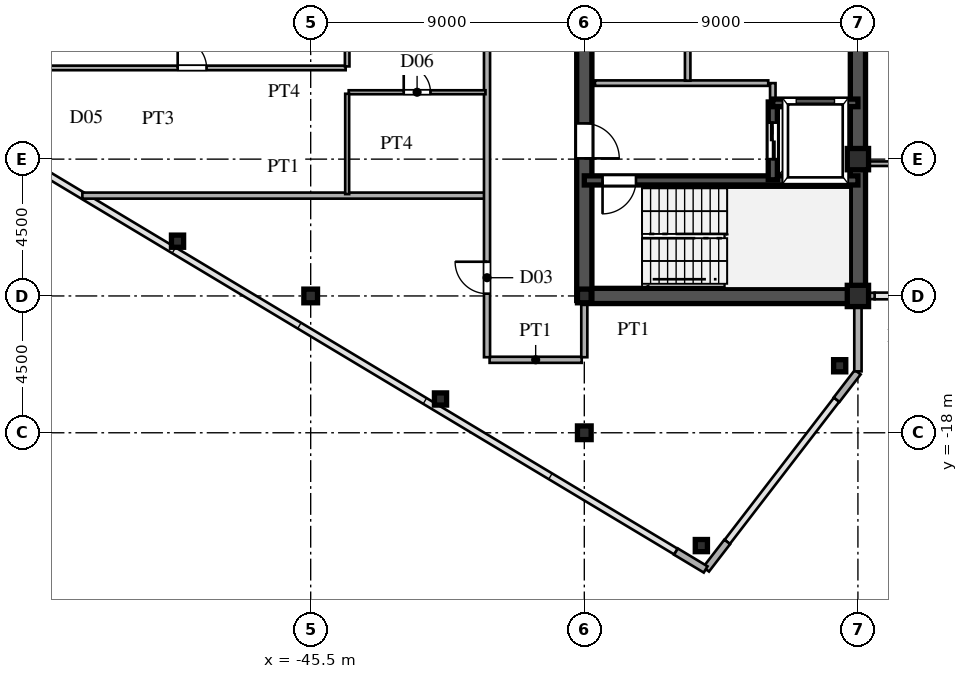
"""IFC4 building model, lengths in metres.
Left out: names, types, materials, properties, quantities, classifications, styles, units other than length and angle.
Written with IfcOpenShell. Run it as: python <this file> out.ifc"""

import sys

from ifc_helpers import new_model, si_unit, direction, frame, frame_2d, origin, origin_2d, place, context, subcontext, project, spatial, rectangle, hollow_rectangle, i_section, extrude, source, transform, mapped, element, fill, save


model = new_model("IFC4")
c1 = context("Model", 3, precision=1e-05, world=origin(), true_north=direction((0.0, 1.0)))
c2 = subcontext(c1, "Body", "Model", "MODEL_VIEW")
j1 = project(units=[si_unit("LENGTHUNIT", "METRE"), si_unit("PLANEANGLEUNIT", "RADIAN")], contexts=[c1])
p1 = place(None, origin())
s1 = spatial("IfcSite", under=j1, at=p1, CompositionType="ELEMENT")
p2 = place(p1, origin())
s2 = spatial("IfcBuilding", under=s1, at=p2, CompositionType="ELEMENT")
p3 = place(p2, frame((0.0, 0.0, 250.65)))
s3 = spatial("IfcBuildingStorey", under=s2, at=p3, CompositionType="ELEMENT", Elevation=250.65)
m1 = source(origin(), c2, "Body", "SweptSolid", [
    extrude(hollow_rectangle(XDim=0.7, YDim=0.7, WallThickness=0.03, at=origin_2d()), origin(), (0.0, 0.0, 1.0), 3.75),
])
for number, where, z_axis, x_axis in (
    (1, (-27.5, -13.5, 0.0), (0.0, 0.0, 1.0), (1.0, 0.0, 0.0)),
    (2, (-27.5, -9.0, 0.0), (0.0, 0.0, 1.0), (1.0, 0.0, 0.0)),
):
    element("IfcColumn", number, at=place(p3, frame(where, z_axis=z_axis, x_axis=x_axis)), inside=s3, PredefinedType="COLUMN", context=c2, shape_type="MappedRepresentation", body=[
        mapped(m1, transform((0.0, 0.0, 0.0), scale=1.0)),
    ])
m2 = source(origin(), c2, "Body", "SweptSolid", [
    extrude(i_section(OverallWidth=0.45, OverallDepth=0.45, WebThickness=0.016, FlangeThickness=0.025, at=origin_2d()), origin(), (0.0, 0.0, 1.0), 3.75),
])
for number, where, z_axis, x_axis in (
    (3, (-36.5, -18.0, 0.0), (0.0, 0.0, 1.0), (1.0, 0.0, 0.0)),
    (4, (-36.5, -13.5, 0.0), (0.0, 0.0, 1.0), (1.0, 0.0, 0.0)),
    (5, (-45.5, -13.5, 0.0), (0.0, 0.0, 1.0), (1.0, 0.0, 0.0)),
):
    element("IfcColumn", number, at=place(p3, frame(where, z_axis=z_axis, x_axis=x_axis)), inside=s3, PredefinedType="COLUMN", context=c2, shape_type="MappedRepresentation", body=[
        mapped(m2, transform((0.0, 0.0, 0.0), scale=1.0)),
    ])
m3 = source(origin(), c2, "Body", "SweptSolid", [
    extrude(hollow_rectangle(XDim=0.4, YDim=0.4, WallThickness=0.016, at=origin_2d()), origin(), (0.0, 0.0, 1.0), 3.75),
])
for number, where, z_axis, x_axis in (
    (6, (-28.1, -15.796, 0.0), (0.0, 0.0, 1.0), (1.0, 0.0, 0.0)),
    (7, (-32.65, -21.71, 0.0), (0.0, 0.0, 1.0), (1.0, 0.0, 0.0)),
    (8, (-41.23, -16.889, 0.0), (0.0, 0.0, 1.0), (1.0, 0.0, 0.0)),
    (9, (-49.88, -11.699, 0.0), (0.0, 0.0, 1.0), (1.0, 0.0, 0.0)),
):
    element("IfcColumn", number, at=place(p3, frame(where, z_axis=z_axis, x_axis=x_axis)), inside=s3, PredefinedType="COLUMN", context=c2, shape_type="MappedRepresentation", body=[
        mapped(m3, transform((0.0, 0.0, 0.0), scale=1.0)),
    ])
p4 = place(p3, frame((-27.5, -15.98, 0.0), z_axis=(0.0, 0.0, 1.0), x_axis=(0.0, 1.0, 0.0)))
e10 = element("IfcWall", 10, at=p4, inside=s3, PredefinedType="SOLIDWALL", context=c2, shape_type="SweptSolid", body=[
    extrude(rectangle(XDim=1.605, YDim=0.24, at=frame_2d((0.803, 0.0))), origin(), (0.0, 0.0, 1.0), 3.53),
])
p5 = place(p3, frame((-27.5, -14.375, 0.0), z_axis=(0.0, 0.0, 1.0), x_axis=(0.0, 1.0, 0.0)))
e11 = element("IfcWall", 11, at=p5, inside=s3, PredefinedType="SOLIDWALL", context=c2, shape_type="SweptSolid", body=[
    extrude(rectangle(XDim=0.62, YDim=0.24, at=frame_2d((0.31, 0.0))), origin(), (0.0, 0.0, 1.0), 3.03),
])
for number, where, z_axis, x_axis in (
    (12, (-33.486, -21.908, 0.0), (0.0, 0.0, 1.0), (0.857, -0.515, 0.0)),
    (13, (-32.494, -22.492, 0.0), (0.0, 0.0, 1.0), (0.61, 0.793, 0.0)),
    (14, (-28.201, -16.912, 0.0), (0.0, 0.0, 1.0), (0.61, 0.793, 0.0)),
):
    element("IfcWall", number, at=place(p3, frame(where, z_axis=z_axis, x_axis=x_axis)), inside=s3, PredefinedType="SOLIDWALL", context=c2, shape_type="SweptSolid", body=[
        extrude(rectangle(XDim=1.14, YDim=0.24, at=frame_2d((0.57, 0.0))), origin(), (0.0, 0.0, 1.0), 3.53),
    ])
p6 = place(p3, frame((-27.49, -13.5, 0.0), z_axis=(0.0, 0.0, 1.0), x_axis=(1.0, 0.0, 0.0)))
e15 = element("IfcWall", 15, at=p6, inside=s3, PredefinedType="SOLIDWALL", context=c2, shape_type="SweptSolid", body=[
    extrude(rectangle(XDim=0.54, YDim=0.21, at=frame_2d((0.27, 0.0))), origin(), (0.0, 0.0, 1.0), 3.03),
])
p7 = place(p3, frame((-27.5, -13.5, 0.0), z_axis=(0.0, 0.0, 1.0), x_axis=(0.0, 1.0, 0.0)))
e16 = element("IfcWall", 16, at=p7, inside=s3, PredefinedType="SHEAR", context=c2, shape_type="SweptSolid", body=[
    extrude(rectangle(XDim=12.2, YDim=0.5, at=frame_2d((6.1, 0.0))), origin(), (0.0, 0.0, 1.0), 3.53),
])
p8 = place(p3, frame((-36.5, -13.5, 0.0), z_axis=(0.0, 0.0, 1.0), x_axis=(1.0, 0.0, 0.0)))
e17 = element("IfcWall", 17, at=p8, inside=s3, PredefinedType="SHEAR", context=c2, shape_type="SweptSolid", body=[
    extrude(rectangle(XDim=9.0, YDim=0.5, at=frame_2d((4.5, 0.0))), origin(), (0.0, 0.0, 1.0), 3.53),
])
p9 = place(p3, frame((-36.5, -13.65, 0.0), z_axis=(0.0, 0.0, 1.0), x_axis=(0.0, 1.0, 0.0)))
e18 = element("IfcWall", 18, at=p9, inside=s3, PredefinedType="SHEAR", context=c2, shape_type="SweptSolid", body=[
    extrude(rectangle(XDim=7.15, YDim=0.5, at=frame_2d((3.575, 0.0))), origin(), (0.0, 0.0, 1.0), 3.53),
])
p10 = place(p9, frame((4.675, 0.0, 0.0)))
e19 = element("IfcOpeningElement", 19, at=p10, cuts=e18, PredefinedType="OPENING", context=c2, shape_type="SweptSolid", body=[
    extrude(rectangle(XDim=1.15, YDim=2.2, at=frame_2d((0.575, 1.1))), frame((0.0, 0.26, 0.0), z_axis=(0.0, -1.0, 0.0), x_axis=(1.0, 0.0, 0.0)), (0.0, 0.0, 1.0), 0.52),
])
p11 = place(p3, frame((-36.5, -6.5, 0.0), z_axis=(0.0, 0.0, 1.0), x_axis=(0.0, 1.0, 0.0)))
e20 = element("IfcWall", 20, at=p11, inside=s3, PredefinedType="SHEAR", context=c2, shape_type="SweptSolid", body=[
    extrude(rectangle(XDim=5.2, YDim=0.5, at=frame_2d((2.6, 0.0))), origin(), (0.0, 0.0, 1.0), 3.53),
])
p12 = place(p11, frame((2.125, 0.0, 0.0)))
e21 = element("IfcOpeningElement", 21, at=p12, cuts=e20, PredefinedType="OPENING", context=c2, shape_type="SweptSolid", body=[
    extrude(rectangle(XDim=0.95, YDim=2.15, at=frame_2d((0.475, 1.075))), frame((0.0, 0.26, 0.0), z_axis=(0.0, -1.0, 0.0), x_axis=(1.0, 0.0, 0.0)), (0.0, 0.0, 1.0), 0.52),
])
p13 = place(p3, frame((-36.5, -9.7, 0.0), z_axis=(0.0, 0.0, 1.0), x_axis=(1.0, 0.0, 0.0)))
e22 = element("IfcWall", 22, at=p13, inside=s3, PredefinedType="SHEAR", context=c2, shape_type="SweptSolid", body=[
    extrude(rectangle(XDim=9.0, YDim=0.3, at=frame_2d((4.5, 0.0))), origin(), (0.0, 0.0, 1.0), 3.53),
])
p14 = place(p13, frame((0.6, 0.0, 0.0)))
e23 = element("IfcOpeningElement", 23, at=p14, cuts=e22, PredefinedType="OPENING", context=c2, shape_type="SweptSolid", body=[
    extrude(rectangle(XDim=1.1, YDim=2.2, at=frame_2d((0.55, 1.1))), frame((0.0, 0.16, 0.0), z_axis=(0.0, -1.0, 0.0), x_axis=(1.0, 0.0, 0.0)), (0.0, 0.0, 1.0), 0.32),
])
p15 = place(p3, frame((-30.3, -7.15, 0.0), z_axis=(0.0, 0.0, 1.0), x_axis=(1.0, 0.0, 0.0)))
e24 = element("IfcWall", 24, at=p15, inside=s3, PredefinedType="SHEAR", context=c2, shape_type="SweptSolid", body=[
    extrude(rectangle(XDim=2.8, YDim=0.25, at=frame_2d((1.4, 0.0))), origin(), (0.0, 0.0, 1.0), 3.53),
])
p16 = place(p3, frame((-30.3, -9.68, 0.0), z_axis=(0.0, 0.0, 1.0), x_axis=(0.0, 1.0, 0.0)))
e25 = element("IfcWall", 25, at=p16, inside=s3, PredefinedType="SHEAR", context=c2, shape_type="SweptSolid", body=[
    extrude(rectangle(XDim=2.56, YDim=0.3, at=frame_2d((1.28, 0.0))), origin(), (0.0, 0.0, 1.0), 3.53),
])
p17 = place(p16, frame((0.68, 0.0, 0.0)))
e26 = element("IfcOpeningElement", 26, at=p17, cuts=e25, PredefinedType="OPENING", context=c2, shape_type="SweptSolid", body=[
    extrude(rectangle(XDim=1.2, YDim=2.25, at=frame_2d((0.6, 1.125))), frame((0.0, 0.16, 0.0), z_axis=(0.0, -1.0, 0.0), x_axis=(1.0, 0.0, 0.0)), (0.0, 0.0, 1.0), 0.32),
])
p18 = place(p3, frame((-36.15, -6.5, 0.0), z_axis=(0.0, 0.0, 1.0), x_axis=(1.0, 0.0, 0.0)))
e27 = element("IfcWall", 27, at=p18, inside=s3, PredefinedType="PARTITIONING", context=c2, shape_type="SweptSolid", body=[
    extrude(rectangle(XDim=5.7, YDim=0.18, at=frame_2d((2.85, 0.0))), origin(), (0.0, 0.0, 1.0), 3.53),
])
p19 = place(p3, frame((-30.3, -7.12, 0.0), z_axis=(0.0, 0.0, 1.0), x_axis=(0.0, 1.0, 0.0)))
e28 = element("IfcWall", 28, at=p19, inside=s3, PredefinedType="PARTITIONING", context=c2, shape_type="SweptSolid", body=[
    extrude(rectangle(XDim=0.62, YDim=0.18, at=frame_2d((0.31, 0.0))), origin(), (0.0, 0.0, 1.0), 3.53),
])
p20 = place(p3, frame((-33.1, -6.42, 0.0), z_axis=(0.0, 0.0, 1.0), x_axis=(0.0, 1.0, 0.0)))
e29 = element("IfcWall", 29, at=p20, inside=s3, PredefinedType="PARTITIONING", context=c2, shape_type="SweptSolid", body=[
    extrude(rectangle(XDim=5.04, YDim=0.18, at=frame_2d((2.52, 0.0))), origin(), (0.0, 0.0, 1.0), 3.53),
])
p21 = place(p3, frame((-39.615, -15.6, 0.0), z_axis=(0.0, 0.0, 1.0), x_axis=(1.0, 0.0, 0.0)))
e30 = element("IfcWall", 30, at=p21, inside=s3, PredefinedType="PARTITIONING", context=c2, shape_type="SweptSolid", body=[
    extrude(rectangle(XDim=3.03, YDim=0.2, at=frame_2d((1.515, 0.0))), origin(), (0.0, 0.0, 1.0), 3.53),
])
p22 = place(p3, frame((-53.01, -10.2, 0.0), z_axis=(0.0, 0.0, 1.0), x_axis=(1.0, 0.0, 0.0)))
e31 = element("IfcWall", 31, at=p22, inside=s3, PredefinedType="PARTITIONING", context=c2, shape_type="SweptSolid", body=[
    extrude(rectangle(XDim=13.23, YDim=0.2, at=frame_2d((6.615, 0.0))), origin(), (0.0, 0.0, 1.0), 3.53),
])
p23 = place(p3, frame((-27.245, -9.15, 0.0), z_axis=(0.0, 0.0, 1.0), x_axis=(1.0, 0.0, 0.0)))
e32 = element("IfcWall", 32, at=p23, inside=s3, PredefinedType="PARTITIONING", context=c2, shape_type="SweptSolid", body=[
    extrude(rectangle(XDim=7.66, YDim=0.15, at=frame_2d((3.83, 0.0))), origin(), (0.0, 0.0, 1.0), 3.53),
])
p24 = place(p23, frame((3.57, 0.0, 0.0)))
e33 = element("IfcOpeningElement", 33, at=p24, cuts=e32, PredefinedType="OPENING", context=c2, shape_type="SweptSolid", body=[
    extrude(rectangle(XDim=0.95, YDim=2.15, at=frame_2d((0.475, 1.075))), frame((0.0, 0.085, 0.0), z_axis=(0.0, -1.0, 0.0), x_axis=(1.0, 0.0, 0.0)), (0.0, 0.0, 1.0), 0.17),
])
p25 = place(p3, frame((-44.25, -6.8, 0.0), z_axis=(0.0, 0.0, 1.0), x_axis=(1.0, 0.0, 0.0)))
e34 = element("IfcWall", 34, at=p25, inside=s3, PredefinedType="PARTITIONING", context=c2, shape_type="SweptSolid", body=[
    extrude(rectangle(XDim=4.5, YDim=0.13, at=frame_2d((2.25, 0.0))), origin(), (0.0, 0.0, 1.0), 3.53),
])
p26 = place(p25, frame((1.81, 0.0, 0.0)))
e35 = element("IfcOpeningElement", 35, at=p26, cuts=e34, PredefinedType="OPENING", context=c2, shape_type="SweptSolid", body=[
    extrude(rectangle(XDim=0.88, YDim=2.1, at=frame_2d((0.44, 1.05))), frame((0.0, 0.075, 0.0), z_axis=(0.0, -1.0, 0.0), x_axis=(1.0, 0.0, 0.0)), (0.0, 0.0, 1.0), 0.15),
])
p27 = place(p3, frame((-60.035, -6.0, 0.0), z_axis=(0.0, 0.0, 1.0), x_axis=(1.0, 0.0, 0.0)))
e36 = element("IfcWall", 36, at=p27, inside=s3, PredefinedType="PARTITIONING", context=c2, shape_type="SweptSolid", body=[
    extrude(rectangle(XDim=15.685, YDim=0.15, at=frame_2d((7.842, 0.0))), origin(), (0.0, 0.0, 1.0), 3.53),
])
p28 = place(p27, frame((10.16, 0.0, 0.0)))
e37 = element("IfcOpeningElement", 37, at=p28, cuts=e36, PredefinedType="OPENING", context=c2, shape_type="SweptSolid", body=[
    extrude(rectangle(XDim=0.95, YDim=2.15, at=frame_2d((0.475, 1.075))), frame((0.0, 0.085, 0.0), z_axis=(0.0, -1.0, 0.0), x_axis=(1.0, 0.0, 0.0)), (0.0, 0.0, 1.0), 0.17),
])
p29 = place(p3, frame((-44.3, -10.15, 0.0), z_axis=(0.0, 0.0, 1.0), x_axis=(0.0, 1.0, 0.0)))
e38 = element("IfcWall", 38, at=p29, inside=s3, PredefinedType="PARTITIONING", context=c2, shape_type="SweptSolid", body=[
    extrude(rectangle(XDim=3.3, YDim=0.13, at=frame_2d((1.65, 0.0))), origin(), (0.0, 0.0, 1.0), 3.53),
])
p30 = place(p3, frame((-44.3, -5.95, 0.0), z_axis=(0.0, 0.0, 1.0), x_axis=(0.0, 1.0, 0.0)))
e39 = element("IfcWall", 39, at=p30, inside=s3, PredefinedType="PARTITIONING", context=c2, shape_type="SweptSolid", body=[
    extrude(rectangle(XDim=4.1, YDim=0.15, at=frame_2d((2.05, 0.0))), origin(), (0.0, 0.0, 1.0), 3.53),
])
p31 = place(p30, frame((1.798, 0.0, 0.0)))
e40 = element("IfcOpeningElement", 40, at=p31, cuts=e39, PredefinedType="OPENING", context=c2, shape_type="SweptSolid", body=[
    extrude(rectangle(XDim=0.95, YDim=2.15, at=frame_2d((0.475, 1.075))), frame((0.0, 0.085, 0.0), z_axis=(0.0, -1.0, 0.0), x_axis=(1.0, 0.0, 0.0)), (0.0, 0.0, 1.0), 0.17),
])
p32 = place(p3, frame((-39.7, -15.515, 0.0), z_axis=(0.0, 0.0, 1.0), x_axis=(0.0, 1.0, 0.0)))
e41 = element("IfcWall", 41, at=p32, inside=s3, PredefinedType="PARTITIONING", context=c2, shape_type="SweptSolid", body=[
    extrude(rectangle(XDim=31.03, YDim=0.2, at=frame_2d((15.515, 0.0))), origin(), (0.0, 0.0, 1.0), 3.53),
])
p33 = place(p32, frame((2.09, 0.0, 0.0)))
e42 = element("IfcOpeningElement", 42, at=p33, cuts=e41, PredefinedType="OPENING", context=c2, shape_type="SweptSolid", body=[
    extrude(rectangle(XDim=1.05, YDim=2.25, at=frame_2d((0.525, 1.125))), frame((0.0, 0.11, 0.0), z_axis=(0.0, -1.0, 0.0), x_axis=(1.0, 0.0, 0.0)), (0.0, 0.0, 1.0), 0.22),
])
p34 = place(p32, frame((10.901, 0.0, 0.0)))
e43 = element("IfcOpeningElement", 43, at=p34, cuts=e41, PredefinedType="OPENING", context=c2, shape_type="SweptSolid", body=[
    extrude(rectangle(XDim=1.05, YDim=2.25, at=frame_2d((0.525, 1.125))), frame((0.0, 0.11, 0.0), z_axis=(0.0, -1.0, 0.0), x_axis=(1.0, 0.0, 0.0)), (0.0, 0.0, 1.0), 0.22),
])
p35 = place(p32, frame((23.99, 0.0, 0.0)))
e44 = element("IfcOpeningElement", 44, at=p35, cuts=e41, PredefinedType="OPENING", context=c2, shape_type="SweptSolid", body=[
    extrude(rectangle(XDim=1.05, YDim=2.25, at=frame_2d((0.525, 1.125))), frame((0.0, 0.11, 0.0), z_axis=(0.0, -1.0, 0.0), x_axis=(1.0, 0.0, 0.0)), (0.0, 0.0, 1.0), 0.22),
])
p36 = place(p3, frame((-36.5, -15.515, 0.0), z_axis=(0.0, 0.0, 1.0), x_axis=(0.0, 1.0, 0.0)))
e45 = element("IfcWall", 45, at=p36, inside=s3, PredefinedType="PARTITIONING", context=c2, shape_type="SweptSolid", body=[
    extrude(rectangle(XDim=1.76, YDim=0.2, at=frame_2d((0.88, 0.0))), origin(), (0.0, 0.0, 1.0), 2.93),
])
m4 = source(origin(), c2, "Body", "SweptSolid", [
    extrude(rectangle(XDim=1.15, YDim=2.2, at=frame_2d((0.575, 1.1))), frame((0.0, 0.025, 0.0), z_axis=(0.0, -1.0, 0.0), x_axis=(1.0, 0.0, 0.0)), (0.0, 0.0, 1.0), 0.05),
])
p37 = place(p10, frame((1.15, 0.0, 0.0), z_axis=(0.0, 0.0, 1.0), x_axis=(-1.0, 0.0, 0.0)))
e46 = element("IfcDoor", 46, at=p37, inside=s3, OperationType="SINGLE_SWING_LEFT", PredefinedType="DOOR", context=c2, shape_type="MappedRepresentation", body=[
    mapped(m4, transform((0.0, 0.0, 0.0), scale=1.0)),
])
fill(e19, e46)
m5 = source(origin(), c2, "Body", "SweptSolid", [
    extrude(rectangle(XDim=1.1, YDim=2.2, at=frame_2d((0.55, 1.1))), frame((0.0, 0.025, 0.0), z_axis=(0.0, -1.0, 0.0), x_axis=(1.0, 0.0, 0.0)), (0.0, 0.0, 1.0), 0.05),
])
p38 = place(p14, frame((1.1, 0.0, 0.0), z_axis=(0.0, 0.0, 1.0), x_axis=(-1.0, 0.0, 0.0)))
e47 = element("IfcDoor", 47, at=p38, inside=s3, OperationType="SINGLE_SWING_LEFT", PredefinedType="DOOR", context=c2, shape_type="MappedRepresentation", body=[
    mapped(m5, transform((0.0, 0.0, 0.0), scale=1.0)),
])
fill(e23, e47)
m6 = source(origin(), c2, "Body", "SweptSolid", [
    extrude(rectangle(XDim=1.2, YDim=2.25, at=frame_2d((0.6, 1.125))), frame((0.0, 0.025, 0.0), z_axis=(0.0, -1.0, 0.0), x_axis=(1.0, 0.0, 0.0)), (0.0, 0.0, 1.0), 0.05),
])
p39 = place(p17, origin())
e48 = element("IfcDoor", 48, at=p39, inside=s3, OperationType="DOUBLE_DOOR_SLIDING", PredefinedType="DOOR", context=c2, shape_type="MappedRepresentation", body=[
    mapped(m6, transform((0.0, 0.0, 0.0), scale=1.0)),
])
fill(e26, e48)
m7 = source(origin(), c2, "Body", "SweptSolid", [
    extrude(rectangle(XDim=0.88, YDim=2.1, at=frame_2d((0.44, 1.05))), frame((0.0, 0.025, 0.0), z_axis=(0.0, -1.0, 0.0), x_axis=(1.0, 0.0, 0.0)), (0.0, 0.0, 1.0), 0.05),
])
p40 = place(p26, origin())
e49 = element("IfcDoor", 49, at=p40, inside=s3, OperationType="SINGLE_SWING_LEFT", PredefinedType="DOOR", context=c2, shape_type="MappedRepresentation", body=[
    mapped(m7, transform((0.0, 0.0, 0.0), scale=1.0)),
])
fill(e35, e49)
m8 = source(origin(), c2, "Body", "SweptSolid", [
    extrude(rectangle(XDim=0.95, YDim=2.15, at=frame_2d((0.475, 1.075))), frame((0.0, 0.025, 0.0), z_axis=(0.0, -1.0, 0.0), x_axis=(1.0, 0.0, 0.0)), (0.0, 0.0, 1.0), 0.05),
])
p41 = place(p28, origin())
e50 = element("IfcDoor", 50, at=p41, inside=s3, OperationType="SINGLE_SWING_LEFT", PredefinedType="DOOR", context=c2, shape_type="MappedRepresentation", body=[
    mapped(m8, transform((0.0, 0.0, 0.0), scale=1.0)),
])
fill(e37, e50)
m9 = source(origin(), c2, "Body", "SweptSolid", [
    extrude(rectangle(XDim=1.05, YDim=2.25, at=frame_2d((0.525, 1.125))), frame((0.0, 0.025, 0.0), z_axis=(0.0, -1.0, 0.0), x_axis=(1.0, 0.0, 0.0)), (0.0, 0.0, 1.0), 0.05),
])
p42 = place(p33, origin())
e51 = element("IfcDoor", 51, at=p42, inside=s3, OperationType="SINGLE_SWING_RIGHT", PredefinedType="DOOR", context=c2, shape_type="MappedRepresentation", body=[
    mapped(m9, transform((0.0, 0.0, 0.0), scale=1.0)),
])
fill(e42, e51)
save(model, sys.argv[1])
